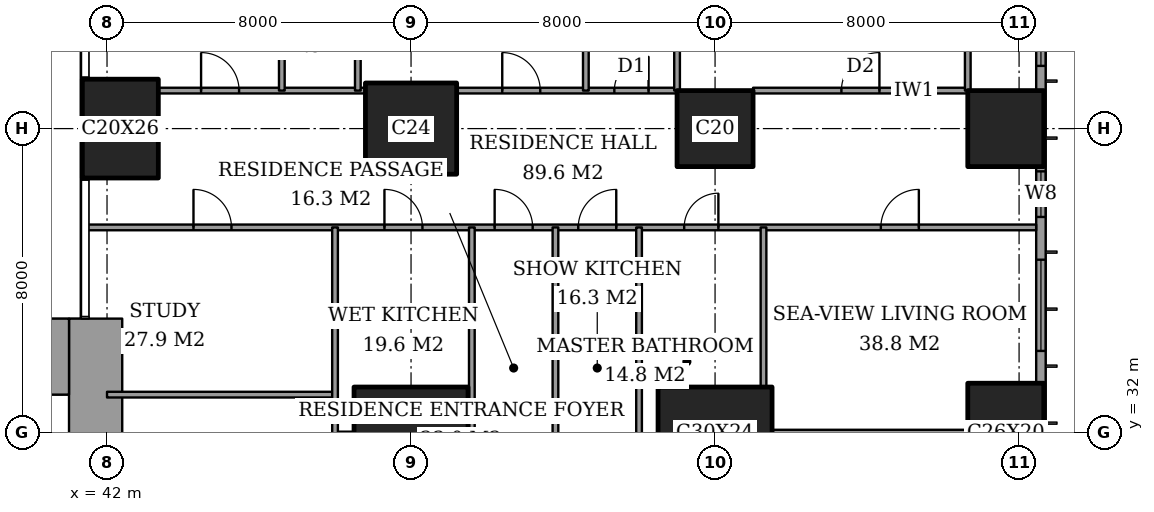
"""IFC4 building model, lengths in metres.
Left out: names, types, materials, properties, quantities, classifications, styles, units other than length and angle.
Written with IfcOpenShell. Run it as: python <this file> out.ifc"""

import sys

from ifc_helpers import new_model, si_unit, direction, frame, frame_2d, origin, origin_2d, place, context, subcontext, project, spatial, rectangle, extrude, element, fill, save


model = new_model("IFC4")
c1 = context("Model", 3, precision=1e-05, world=origin(), true_north=direction((0.0, 1.0)))
c2 = subcontext(c1, "Body", "Model", "MODEL_VIEW")
j1 = project(units=[si_unit("LENGTHUNIT", "METRE"), si_unit("PLANEANGLEUNIT", "RADIAN")], contexts=[c1])
p1 = place(None, origin())
s1 = spatial("IfcSite", under=j1, at=p1, CompositionType="ELEMENT")
p2 = place(p1, origin())
s2 = spatial("IfcBuilding", under=s1, at=p2, CompositionType="ELEMENT")
p3 = place(p2, frame((0.0, 0.0, 80.0)))
s3 = spatial("IfcBuildingStorey", under=s2, at=p3, CompositionType="ELEMENT", Elevation=80.0)
p4 = place(p3, frame((42.35, 40.0, 0.0), z_axis=(0.0, 0.0, 1.0), x_axis=(1.0, 0.0, 0.0)))
e1 = element("IfcColumn", 1, at=p4, inside=s3, PredefinedType="COLUMN", context=c2, shape_type="SweptSolid", body=[
    extrude(rectangle(XDim=2.0, YDim=2.6, at=origin_2d()), origin(), (0.0, 0.0, 1.0), 3.6),
])
p5 = place(p3, frame((50.0, 32.0, 0.0), z_axis=(0.0, 0.0, 1.0), x_axis=(1.0, 0.0, 0.0)))
e2 = element("IfcColumn", 2, at=p5, inside=s3, PredefinedType="COLUMN", context=c2, shape_type="SweptSolid", body=[
    extrude(rectangle(XDim=3.0, YDim=2.4, at=origin_2d()), origin(), (0.0, 0.0, 1.0), 3.6),
])
p6 = place(p3, frame((50.0, 40.0, 0.0), z_axis=(0.0, 0.0, 1.0), x_axis=(1.0, 0.0, 0.0)))
e3 = element("IfcColumn", 3, at=p6, inside=s3, PredefinedType="COLUMN", context=c2, shape_type="SweptSolid", body=[
    extrude(rectangle(XDim=2.4, YDim=2.4, at=origin_2d()), origin(), (0.0, 0.0, 1.0), 3.6),
])
p7 = place(p3, frame((58.0, 32.0, 0.0), z_axis=(0.0, 0.0, 1.0), x_axis=(1.0, 0.0, 0.0)))
e4 = element("IfcColumn", 4, at=p7, inside=s3, PredefinedType="COLUMN", context=c2, shape_type="SweptSolid", body=[
    extrude(rectangle(XDim=3.0, YDim=2.4, at=origin_2d()), origin(), (0.0, 0.0, 1.0), 3.6),
])
p8 = place(p3, frame((58.0, 40.0, 0.0), z_axis=(0.0, 0.0, 1.0), x_axis=(1.0, 0.0, 0.0)))
e5 = element("IfcColumn", 5, at=p8, inside=s3, PredefinedType="COLUMN", context=c2, shape_type="SweptSolid", body=[
    extrude(rectangle(XDim=2.0, YDim=2.0, at=origin_2d()), origin(), (0.0, 0.0, 1.0), 3.6),
])
p9 = place(p3, frame((65.65, 32.0, 0.0), z_axis=(0.0, 0.0, 1.0), x_axis=(0.0, 1.0, 0.0)))
e6 = element("IfcColumn", 6, at=p9, inside=s3, PredefinedType="COLUMN", context=c2, shape_type="SweptSolid", body=[
    extrude(rectangle(XDim=2.6, YDim=2.0, at=origin_2d()), origin(), (0.0, 0.0, 1.0), 3.6),
])
p10 = place(p3, frame((65.65, 40.0, 0.0), z_axis=(0.0, 0.0, 1.0), x_axis=(1.0, 0.0, 0.0)))
e7 = element("IfcColumn", 7, at=p10, inside=s3, PredefinedType="COLUMN", context=c2, shape_type="SweptSolid", body=[
    extrude(rectangle(XDim=2.0, YDim=2.0, at=origin_2d()), origin(), (0.0, 0.0, 1.0), 3.6),
])
p11 = place(p3, frame((37.85, 34.0, 0.0), z_axis=(0.0, 0.0, 1.0), x_axis=(1.0, 0.0, 0.0)))
e8 = element("IfcWall", 8, at=p11, inside=s3, PredefinedType="SHEAR", context=c2, shape_type="SweptSolid", body=[
    extrude(rectangle(XDim=3.15, YDim=2.0, at=frame_2d((1.575, 0.0))), origin(), (0.0, 0.0, 1.0), 3.6),
])
p12 = place(p3, frame((41.7, 24.85, 0.0), z_axis=(0.0, 0.0, 1.0), x_axis=(0.0, 1.0, 0.0)))
e9 = element("IfcWall", 9, at=p12, inside=s3, PredefinedType="SHEAR", context=c2, shape_type="SweptSolid", body=[
    extrude(rectangle(XDim=10.15, YDim=1.4, at=frame_2d((5.075, 0.0))), origin(), (0.0, 0.0, 1.0), 3.6),
])
p13 = place(p3, frame((66.575, 3.175, 0.0), z_axis=(0.0, 0.0, 1.0), x_axis=(0.0, 1.0, 0.0)))
e10 = element("IfcWall", 10, at=p13, inside=s3, PredefinedType="SOLIDWALL", context=c2, shape_type="SweptSolid", body=[
    extrude(rectangle(XDim=41.65, YDim=0.25, at=frame_2d((20.825, 0.0))), origin(), (0.0, 0.0, 1.0), 3.6),
])
p14 = place(p13, frame((0.775, 0.0, 0.6)))
e11 = element("IfcOpeningElement", 11, at=p14, cuts=e10, PredefinedType="OPENING", context=c2, shape_type="SweptSolid", body=[
    extrude(rectangle(XDim=2.4, YDim=2.0, at=frame_2d((1.2, 1.0))), frame((0.0, 0.135, 0.0), z_axis=(0.0, -1.0, 0.0), x_axis=(1.0, 0.0, 0.0)), (0.0, 0.0, 1.0), 0.27),
])
p15 = place(p13, frame((6.1, 0.0, 0.6)))
e12 = element("IfcOpeningElement", 12, at=p15, cuts=e10, PredefinedType="OPENING", context=c2, shape_type="SweptSolid", body=[
    extrude(rectangle(XDim=1.2, YDim=2.0, at=frame_2d((0.6, 1.0))), frame((0.0, 0.135, 0.0), z_axis=(0.0, -1.0, 0.0), x_axis=(1.0, 0.0, 0.0)), (0.0, 0.0, 1.0), 0.27),
])
p16 = place(p13, frame((8.275, 0.0, 0.6)))
e13 = element("IfcOpeningElement", 13, at=p16, cuts=e10, PredefinedType="OPENING", context=c2, shape_type="SweptSolid", body=[
    extrude(rectangle(XDim=2.4, YDim=2.0, at=frame_2d((1.2, 1.0))), frame((0.0, 0.135, 0.0), z_axis=(0.0, -1.0, 0.0), x_axis=(1.0, 0.0, 0.0)), (0.0, 0.0, 1.0), 0.27),
])
p17 = place(p13, frame((15.775, 0.0, 0.6)))
e14 = element("IfcOpeningElement", 14, at=p17, cuts=e10, PredefinedType="OPENING", context=c2, shape_type="SweptSolid", body=[
    extrude(rectangle(XDim=2.4, YDim=2.0, at=frame_2d((1.2, 1.0))), frame((0.0, 0.135, 0.0), z_axis=(0.0, -1.0, 0.0), x_axis=(1.0, 0.0, 0.0)), (0.0, 0.0, 1.0), 0.27),
])
p18 = place(p13, frame((23.475, 0.0, 0.6)))
e15 = element("IfcOpeningElement", 15, at=p18, cuts=e10, PredefinedType="OPENING", context=c2, shape_type="SweptSolid", body=[
    extrude(rectangle(XDim=2.4, YDim=2.0, at=frame_2d((1.2, 1.0))), frame((0.0, 0.135, 0.0), z_axis=(0.0, -1.0, 0.0), x_axis=(1.0, 0.0, 0.0)), (0.0, 0.0, 1.0), 0.27),
])
p19 = place(p13, frame((30.975, 0.0, 0.6)))
e16 = element("IfcOpeningElement", 16, at=p19, cuts=e10, PredefinedType="OPENING", context=c2, shape_type="SweptSolid", body=[
    extrude(rectangle(XDim=2.4, YDim=2.0, at=frame_2d((1.2, 1.0))), frame((0.0, 0.135, 0.0), z_axis=(0.0, -1.0, 0.0), x_axis=(1.0, 0.0, 0.0)), (0.0, 0.0, 1.0), 0.27),
])
p20 = place(p13, frame((34.5, 0.0, 0.6)))
e17 = element("IfcOpeningElement", 17, at=p20, cuts=e10, PredefinedType="OPENING", context=c2, shape_type="SweptSolid", body=[
    extrude(rectangle(XDim=1.2, YDim=2.0, at=frame_2d((0.6, 1.0))), frame((0.0, 0.135, 0.0), z_axis=(0.0, -1.0, 0.0), x_axis=(1.0, 0.0, 0.0)), (0.0, 0.0, 1.0), 0.27),
])
p21 = place(p13, frame((38.475, 0.0, 0.6)))
e18 = element("IfcOpeningElement", 18, at=p21, cuts=e10, PredefinedType="OPENING", context=c2, shape_type="SweptSolid", body=[
    extrude(rectangle(XDim=2.4, YDim=2.0, at=frame_2d((1.2, 1.0))), frame((0.0, 0.135, 0.0), z_axis=(0.0, -1.0, 0.0), x_axis=(1.0, 0.0, 0.0)), (0.0, 0.0, 1.0), 0.27),
])
p22 = place(p3, frame((48.0, 31.95, 0.0), z_axis=(0.0, 0.0, 1.0), x_axis=(1.0, 0.0, 0.0)))
e19 = element("IfcWall", 19, at=p22, inside=s3, PredefinedType="PARTITIONING", context=c2, shape_type="SweptSolid", body=[
    extrude(rectangle(XDim=0.5, YDim=0.15, at=frame_2d((0.25, 0.0))), origin(), (0.0, 0.0, 1.0), 2.634),
])
p23 = place(p3, frame((59.5, 32.0, 0.0), z_axis=(0.0, 0.0, 1.0), x_axis=(1.0, 0.0, 0.0)))
e20 = element("IfcWall", 20, at=p23, inside=s3, PredefinedType="PARTITIONING", context=c2, shape_type="SweptSolid", body=[
    extrude(rectangle(XDim=5.15, YDim=0.15, at=frame_2d((2.575, 0.0))), origin(), (0.0, 0.0, 1.0), 2.634),
])
p24 = place(p3, frame((42.0, 33.0, 0.0), z_axis=(0.0, 0.0, 1.0), x_axis=(1.0, 0.0, 0.0)))
e21 = element("IfcWall", 21, at=p24, inside=s3, PredefinedType="PARTITIONING", context=c2, shape_type="SweptSolid", body=[
    extrude(rectangle(XDim=6.0, YDim=0.15, at=frame_2d((3.0, 0.0))), origin(), (0.0, 0.0, 1.0), 3.35),
])
p25 = place(p3, frame((41.439, 37.4, 0.0), z_axis=(0.0, 0.0, 1.0), x_axis=(1.0, 0.0, 0.0)))
e22 = element("IfcWall", 22, at=p25, inside=s3, PredefinedType="PARTITIONING", context=c2, shape_type="SweptSolid", body=[
    extrude(rectangle(XDim=25.011, YDim=0.15, at=frame_2d((12.505, 0.0))), origin(), (0.0, 0.0, 1.0), 3.35),
])
p26 = place(p25, frame((10.761, 0.0, 0.0)))
e23 = element("IfcOpeningElement", 23, at=p26, cuts=e22, PredefinedType="OPENING", context=c2, shape_type="SweptSolid", body=[
    extrude(rectangle(XDim=1.0, YDim=2.1, at=frame_2d((0.5, 1.05))), frame((0.0, 0.085, 0.0), z_axis=(0.0, -1.0, 0.0), x_axis=(1.0, 0.0, 0.0)), (0.0, 0.0, 1.0), 0.17),
])
p27 = place(p25, frame((20.924, 0.0, 0.0)))
e24 = element("IfcOpeningElement", 24, at=p27, cuts=e22, PredefinedType="OPENING", context=c2, shape_type="SweptSolid", body=[
    extrude(rectangle(XDim=1.0, YDim=2.1, at=frame_2d((0.5, 1.05))), frame((0.0, 0.085, 0.0), z_axis=(0.0, -1.0, 0.0), x_axis=(1.0, 0.0, 0.0)), (0.0, 0.0, 1.0), 0.17),
])
p28 = place(p25, frame((15.749, 0.0, 0.0)))
e25 = element("IfcOpeningElement", 25, at=p28, cuts=e22, PredefinedType="OPENING", context=c2, shape_type="SweptSolid", body=[
    extrude(rectangle(XDim=0.9, YDim=2.1, at=frame_2d((0.45, 1.05))), frame((0.0, 0.085, 0.0), z_axis=(0.0, -1.0, 0.0), x_axis=(1.0, 0.0, 0.0)), (0.0, 0.0, 1.0), 0.17),
])
p29 = place(p25, frame((12.961, 0.0, 0.0)))
e26 = element("IfcOpeningElement", 26, at=p29, cuts=e22, PredefinedType="OPENING", context=c2, shape_type="SweptSolid", body=[
    extrude(rectangle(XDim=1.0, YDim=2.1, at=frame_2d((0.5, 1.05))), frame((0.0, 0.085, 0.0), z_axis=(0.0, -1.0, 0.0), x_axis=(1.0, 0.0, 0.0)), (0.0, 0.0, 1.0), 0.17),
])
p30 = place(p25, frame((7.861, 0.0, 0.0)))
e27 = element("IfcOpeningElement", 27, at=p30, cuts=e22, PredefinedType="OPENING", context=c2, shape_type="SweptSolid", body=[
    extrude(rectangle(XDim=1.0, YDim=2.1, at=frame_2d((0.5, 1.05))), frame((0.0, 0.085, 0.0), z_axis=(0.0, -1.0, 0.0), x_axis=(1.0, 0.0, 0.0)), (0.0, 0.0, 1.0), 0.17),
])
p31 = place(p25, frame((2.836, 0.0, 0.0)))
e28 = element("IfcOpeningElement", 28, at=p31, cuts=e22, PredefinedType="OPENING", context=c2, shape_type="SweptSolid", body=[
    extrude(rectangle(XDim=1.0, YDim=2.1, at=frame_2d((0.5, 1.05))), frame((0.0, 0.085, 0.0), z_axis=(0.0, -1.0, 0.0), x_axis=(1.0, 0.0, 0.0)), (0.0, 0.0, 1.0), 0.17),
])
p32 = place(p3, frame((43.35, 41.0, 0.0), z_axis=(0.0, 0.0, 1.0), x_axis=(1.0, 0.0, 0.0)))
e29 = element("IfcWall", 29, at=p32, inside=s3, PredefinedType="PARTITIONING", context=c2, shape_type="SweptSolid", body=[
    extrude(rectangle(XDim=5.45, YDim=0.15, at=frame_2d((2.725, 0.0))), origin(), (0.0, 0.0, 1.0), 3.35),
])
p33 = place(p32, frame((1.125, 0.0, 0.0)))
e30 = element("IfcOpeningElement", 30, at=p33, cuts=e29, PredefinedType="OPENING", context=c2, shape_type="SweptSolid", body=[
    extrude(rectangle(XDim=1.0, YDim=2.1, at=frame_2d((0.5, 1.05))), frame((0.0, 0.085, 0.0), z_axis=(0.0, -1.0, 0.0), x_axis=(1.0, 0.0, 0.0)), (0.0, 0.0, 1.0), 0.17),
])
p34 = place(p3, frame((51.2, 41.0, 0.0), z_axis=(0.0, 0.0, 1.0), x_axis=(1.0, 0.0, 0.0)))
e31 = element("IfcWall", 31, at=p34, inside=s3, PredefinedType="PARTITIONING", context=c2, shape_type="SweptSolid", body=[
    extrude(rectangle(XDim=5.8, YDim=0.15, at=frame_2d((2.9, 0.0))), origin(), (0.0, 0.0, 1.0), 3.35),
])
p35 = place(p34, frame((4.15, 0.0, 0.0)))
e32 = element("IfcOpeningElement", 32, at=p35, cuts=e31, PredefinedType="OPENING", context=c2, shape_type="SweptSolid", body=[
    extrude(rectangle(XDim=0.9, YDim=2.1, at=frame_2d((0.45, 1.05))), frame((0.0, 0.085, 0.0), z_axis=(0.0, -1.0, 0.0), x_axis=(1.0, 0.0, 0.0)), (0.0, 0.0, 1.0), 0.17),
])
p36 = place(p34, frame((1.2, 0.0, 0.0)))
e33 = element("IfcOpeningElement", 33, at=p36, cuts=e31, PredefinedType="OPENING", context=c2, shape_type="SweptSolid", body=[
    extrude(rectangle(XDim=1.0, YDim=2.1, at=frame_2d((0.5, 1.05))), frame((0.0, 0.085, 0.0), z_axis=(0.0, -1.0, 0.0), x_axis=(1.0, 0.0, 0.0)), (0.0, 0.0, 1.0), 0.17),
])
p37 = place(p3, frame((59.0, 41.0, 0.0), z_axis=(0.0, 0.0, 1.0), x_axis=(1.0, 0.0, 0.0)))
e34 = element("IfcWall", 34, at=p37, inside=s3, PredefinedType="PARTITIONING", context=c2, shape_type="SweptSolid", body=[
    extrude(rectangle(XDim=5.65, YDim=0.15, at=frame_2d((2.825, 0.0))), origin(), (0.0, 0.0, 1.0), 3.35),
])
p38 = place(p37, frame((2.325, 0.0, 0.0)))
e35 = element("IfcOpeningElement", 35, at=p38, cuts=e34, PredefinedType="OPENING", context=c2, shape_type="SweptSolid", body=[
    extrude(rectangle(XDim=1.0, YDim=2.1, at=frame_2d((0.5, 1.05))), frame((0.0, 0.085, 0.0), z_axis=(0.0, -1.0, 0.0), x_axis=(1.0, 0.0, 0.0)), (0.0, 0.0, 1.0), 0.17),
])
p39 = place(p3, frame((46.6, 41.0, 0.0), z_axis=(0.0, 0.0, 1.0), x_axis=(0.0, 1.0, 0.0)))
e36 = element("IfcWall", 36, at=p39, inside=s3, PredefinedType="PARTITIONING", context=c2, shape_type="SweptSolid", body=[
    extrude(rectangle(XDim=7.45, YDim=0.15, at=frame_2d((3.725, 0.0))), origin(), (0.0, 0.0, 1.0), 3.35),
])
p40 = place(p39, frame((3.275, 0.0, 0.0)))
e37 = element("IfcOpeningElement", 37, at=p40, cuts=e36, PredefinedType="OPENING", context=c2, shape_type="SweptSolid", body=[
    extrude(rectangle(XDim=0.9, YDim=2.1, at=frame_2d((0.45, 1.05))), frame((0.0, 0.085, 0.0), z_axis=(0.0, -1.0, 0.0), x_axis=(1.0, 0.0, 0.0)), (0.0, 0.0, 1.0), 0.17),
])
p41 = place(p3, frame((48.0, 28.0, 0.0), z_axis=(0.0, 0.0, 1.0), x_axis=(0.0, 1.0, 0.0)))
e38 = element("IfcWall", 38, at=p41, inside=s3, PredefinedType="PARTITIONING", context=c2, shape_type="SweptSolid", body=[
    extrude(rectangle(XDim=9.4, YDim=0.15, at=frame_2d((4.7, 0.0))), origin(), (0.0, 0.0, 1.0), 3.35),
])
p42 = place(p41, frame((0.55, 0.0, 0.0)))
e39 = element("IfcOpeningElement", 39, at=p42, cuts=e38, PredefinedType="OPENING", context=c2, shape_type="SweptSolid", body=[
    extrude(rectangle(XDim=0.9, YDim=2.1, at=frame_2d((0.45, 1.05))), frame((0.0, 0.085, 0.0), z_axis=(0.0, -1.0, 0.0), x_axis=(1.0, 0.0, 0.0)), (0.0, 0.0, 1.0), 0.17),
])
p43 = place(p3, frame((48.6, 41.0, 0.0), z_axis=(0.0, 0.0, 1.0), x_axis=(0.0, 1.0, 0.0)))
e40 = element("IfcWall", 40, at=p43, inside=s3, PredefinedType="PARTITIONING", context=c2, shape_type="SweptSolid", body=[
    extrude(rectangle(XDim=7.45, YDim=0.15, at=frame_2d((3.725, 0.0))), origin(), (0.0, 0.0, 1.0), 3.35),
])
for number, where, z_axis, x_axis in (
    (41, (51.6, 30.0, 0.0), (0.0, 0.0, 1.0), (0.0, 1.0, 0.0)),
    (42, (53.8, 30.0, 0.0), (0.0, 0.0, 1.0), (0.0, 1.0, 0.0)),
):
    element("IfcWall", number, at=place(p3, frame(where, z_axis=z_axis, x_axis=x_axis)), inside=s3, PredefinedType="PARTITIONING", context=c2, shape_type="SweptSolid", body=[
        extrude(rectangle(XDim=7.4, YDim=0.15, at=frame_2d((3.7, 0.0))), origin(), (0.0, 0.0, 1.0), 3.35),
    ])
p44 = place(p3, frame((54.6, 41.0, 0.0), z_axis=(0.0, 0.0, 1.0), x_axis=(0.0, 1.0, 0.0)))
e43 = element("IfcWall", 43, at=p44, inside=s3, PredefinedType="PARTITIONING", context=c2, shape_type="SweptSolid", body=[
    extrude(rectangle(XDim=7.45, YDim=0.15, at=frame_2d((3.725, 0.0))), origin(), (0.0, 0.0, 1.0), 3.35),
])
p45 = place(p3, frame((56.0, 28.0, 0.0), z_axis=(0.0, 0.0, 1.0), x_axis=(0.0, 1.0, 0.0)))
e44 = element("IfcWall", 44, at=p45, inside=s3, PredefinedType="PARTITIONING", context=c2, shape_type="SweptSolid", body=[
    extrude(rectangle(XDim=9.4, YDim=0.15, at=frame_2d((4.7, 0.0))), origin(), (0.0, 0.0, 1.0), 3.35),
])
p46 = place(p45, frame((0.5, 0.0, 0.0)))
e45 = element("IfcOpeningElement", 45, at=p46, cuts=e44, PredefinedType="OPENING", context=c2, shape_type="SweptSolid", body=[
    extrude(rectangle(XDim=1.0, YDim=2.1, at=frame_2d((0.5, 1.05))), frame((0.0, 0.085, 0.0), z_axis=(0.0, -1.0, 0.0), x_axis=(1.0, 0.0, 0.0)), (0.0, 0.0, 1.0), 0.17),
])
p47 = place(p3, frame((57.0, 41.0, 0.0), z_axis=(0.0, 0.0, 1.0), x_axis=(0.0, 1.0, 0.0)))
e46 = element("IfcWall", 46, at=p47, inside=s3, PredefinedType="PARTITIONING", context=c2, shape_type="SweptSolid", body=[
    extrude(rectangle(XDim=5.65, YDim=0.15, at=frame_2d((2.825, 0.0))), origin(), (0.0, 0.0, 1.0), 3.35),
])
p48 = place(p3, frame((59.275, 33.2, 0.0), z_axis=(0.0, 0.0, 1.0), x_axis=(0.0, 1.0, 0.0)))
e47 = element("IfcWall", 47, at=p48, inside=s3, PredefinedType="PARTITIONING", context=c2, shape_type="SweptSolid", body=[
    extrude(rectangle(XDim=4.2, YDim=0.15, at=frame_2d((2.1, 0.0))), origin(), (0.0, 0.0, 1.0), 3.35),
])
p49 = place(p3, frame((64.65, 41.0, 0.0), z_axis=(0.0, 0.0, 1.0), x_axis=(0.0, 1.0, 0.0)))
e48 = element("IfcWall", 48, at=p49, inside=s3, PredefinedType="PARTITIONING", context=c2, shape_type="SweptSolid", body=[
    extrude(rectangle(XDim=3.7, YDim=0.15, at=frame_2d((1.85, 0.0))), origin(), (0.0, 0.0, 1.0), 3.35),
])
p50 = place(p49, frame((1.4, 0.0, 0.0)))
e49 = element("IfcOpeningElement", 49, at=p50, cuts=e48, PredefinedType="OPENING", context=c2, shape_type="SweptSolid", body=[
    extrude(rectangle(XDim=0.9, YDim=2.1, at=frame_2d((0.45, 1.05))), frame((0.0, 0.085, 0.0), z_axis=(0.0, -1.0, 0.0), x_axis=(1.0, 0.0, 0.0)), (0.0, 0.0, 1.0), 0.17),
])
p51 = place(p19, origin())
e50 = element("IfcWindow", 50, at=p51, inside=s3, PartitioningType="SINGLE_PANEL", PredefinedType="WINDOW", context=c2, shape_type="SweptSolid", body=[
    extrude(rectangle(XDim=2.4, YDim=2.0, at=frame_2d((1.2, 1.0))), frame((0.0, 0.03, 0.0), z_axis=(0.0, -1.0, 0.0), x_axis=(1.0, 0.0, 0.0)), (0.0, 0.0, 1.0), 0.06),
])
fill(e16, e50)
p52 = place(p20, origin())
e51 = element("IfcWindow", 51, at=p52, inside=s3, PartitioningType="SINGLE_PANEL", PredefinedType="WINDOW", context=c2, shape_type="SweptSolid", body=[
    extrude(rectangle(XDim=1.2, YDim=2.0, at=frame_2d((0.6, 1.0))), frame((0.0, 0.03, 0.0), z_axis=(0.0, -1.0, 0.0), x_axis=(1.0, 0.0, 0.0)), (0.0, 0.0, 1.0), 0.06),
])
fill(e17, e51)
p53 = place(p21, origin())
e52 = element("IfcWindow", 52, at=p53, inside=s3, PartitioningType="SINGLE_PANEL", PredefinedType="WINDOW", context=c2, shape_type="SweptSolid", body=[
    extrude(rectangle(XDim=2.4, YDim=2.0, at=frame_2d((1.2, 1.0))), frame((0.0, 0.03, 0.0), z_axis=(0.0, -1.0, 0.0), x_axis=(1.0, 0.0, 0.0)), (0.0, 0.0, 1.0), 0.06),
])
fill(e18, e52)
p54 = place(p38, origin())
e53 = element("IfcDoor", 53, at=p54, inside=s3, OperationType="SINGLE_SWING_LEFT", PredefinedType="DOOR", context=c2, shape_type="SweptSolid", body=[
    extrude(rectangle(XDim=1.0, YDim=2.1, at=frame_2d((0.5, 1.05))), frame((0.0, 0.025, 0.0), z_axis=(0.0, -1.0, 0.0), x_axis=(1.0, 0.0, 0.0)), (0.0, 0.0, 1.0), 0.05),
])
fill(e35, e53)
p55 = place(p35, origin())
e54 = element("IfcDoor", 54, at=p55, inside=s3, OperationType="SINGLE_SWING_LEFT", PredefinedType="DOOR", context=c2, shape_type="SweptSolid", body=[
    extrude(rectangle(XDim=0.9, YDim=2.1, at=frame_2d((0.45, 1.05))), frame((0.0, 0.025, 0.0), z_axis=(0.0, -1.0, 0.0), x_axis=(1.0, 0.0, 0.0)), (0.0, 0.0, 1.0), 0.05),
])
fill(e32, e54)
p56 = place(p36, origin())
e55 = element("IfcDoor", 55, at=p56, inside=s3, OperationType="SINGLE_SWING_RIGHT", PredefinedType="DOOR", context=c2, shape_type="SweptSolid", body=[
    extrude(rectangle(XDim=1.0, YDim=2.1, at=frame_2d((0.5, 1.05))), frame((0.0, 0.025, 0.0), z_axis=(0.0, -1.0, 0.0), x_axis=(1.0, 0.0, 0.0)), (0.0, 0.0, 1.0), 0.05),
])
fill(e33, e55)
p57 = place(p33, origin())
e56 = element("IfcDoor", 56, at=p57, inside=s3, OperationType="SINGLE_SWING_RIGHT", PredefinedType="DOOR", context=c2, shape_type="SweptSolid", body=[
    extrude(rectangle(XDim=1.0, YDim=2.1, at=frame_2d((0.5, 1.05))), frame((0.0, 0.025, 0.0), z_axis=(0.0, -1.0, 0.0), x_axis=(1.0, 0.0, 0.0)), (0.0, 0.0, 1.0), 0.05),
])
fill(e30, e56)
p58 = place(p26, origin())
e57 = element("IfcDoor", 57, at=p58, inside=s3, OperationType="SINGLE_SWING_RIGHT", PredefinedType="DOOR", context=c2, shape_type="SweptSolid", body=[
    extrude(rectangle(XDim=1.0, YDim=2.1, at=frame_2d((0.5, 1.05))), frame((0.0, 0.025, 0.0), z_axis=(0.0, -1.0, 0.0), x_axis=(1.0, 0.0, 0.0)), (0.0, 0.0, 1.0), 0.05),
])
fill(e23, e57)
p59 = place(p27, origin())
e58 = element("IfcDoor", 58, at=p59, inside=s3, OperationType="SINGLE_SWING_LEFT", PredefinedType="DOOR", context=c2, shape_type="SweptSolid", body=[
    extrude(rectangle(XDim=1.0, YDim=2.1, at=frame_2d((0.5, 1.05))), frame((0.0, 0.025, 0.0), z_axis=(0.0, -1.0, 0.0), x_axis=(1.0, 0.0, 0.0)), (0.0, 0.0, 1.0), 0.05),
])
fill(e24, e58)
p60 = place(p28, origin())
e59 = element("IfcDoor", 59, at=p60, inside=s3, OperationType="SINGLE_SWING_LEFT", PredefinedType="DOOR", context=c2, shape_type="SweptSolid", body=[
    extrude(rectangle(XDim=0.9, YDim=2.1, at=frame_2d((0.45, 1.05))), frame((0.0, 0.025, 0.0), z_axis=(0.0, -1.0, 0.0), x_axis=(1.0, 0.0, 0.0)), (0.0, 0.0, 1.0), 0.05),
])
fill(e25, e59)
p61 = place(p29, origin())
e60 = element("IfcDoor", 60, at=p61, inside=s3, OperationType="SINGLE_SWING_LEFT", PredefinedType="DOOR", context=c2, shape_type="SweptSolid", body=[
    extrude(rectangle(XDim=1.0, YDim=2.1, at=frame_2d((0.5, 1.05))), frame((0.0, 0.025, 0.0), z_axis=(0.0, -1.0, 0.0), x_axis=(1.0, 0.0, 0.0)), (0.0, 0.0, 1.0), 0.05),
])
fill(e26, e60)
p62 = place(p30, origin())
e61 = element("IfcDoor", 61, at=p62, inside=s3, OperationType="SINGLE_SWING_RIGHT", PredefinedType="DOOR", context=c2, shape_type="SweptSolid", body=[
    extrude(rectangle(XDim=1.0, YDim=2.1, at=frame_2d((0.5, 1.05))), frame((0.0, 0.025, 0.0), z_axis=(0.0, -1.0, 0.0), x_axis=(1.0, 0.0, 0.0)), (0.0, 0.0, 1.0), 0.05),
])
fill(e27, e61)
p63 = place(p31, origin())
e62 = element("IfcDoor", 62, at=p63, inside=s3, OperationType="SINGLE_SWING_RIGHT", PredefinedType="DOOR", context=c2, shape_type="SweptSolid", body=[
    extrude(rectangle(XDim=1.0, YDim=2.1, at=frame_2d((0.5, 1.05))), frame((0.0, 0.025, 0.0), z_axis=(0.0, -1.0, 0.0), x_axis=(1.0, 0.0, 0.0)), (0.0, 0.0, 1.0), 0.05),
])
fill(e28, e62)
save(model, sys.argv[1])
